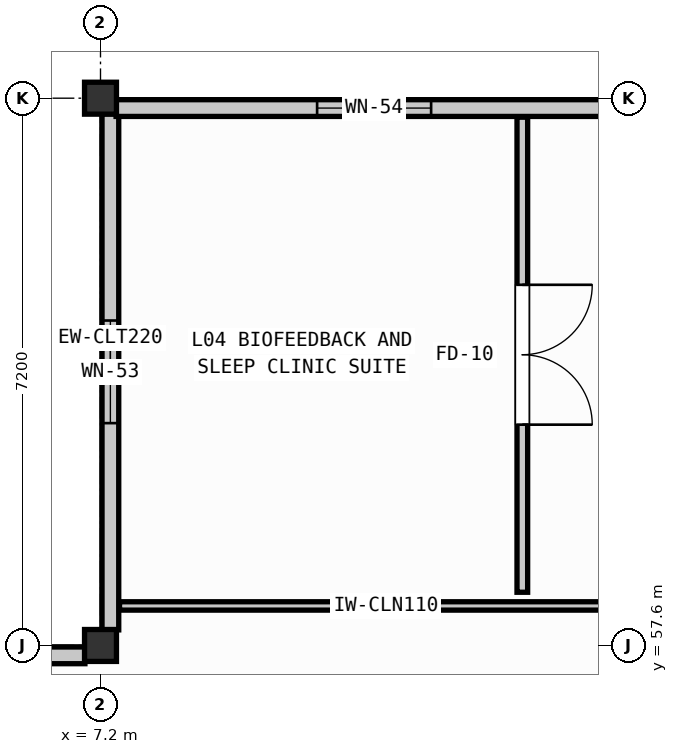
"""IFC4 building model, lengths in metres.
Left out: names, types, materials, properties, quantities, classifications, styles, units other than length and angle.
Written with IfcOpenShell. Run it as: python <this file> out.ifc"""

import sys

from ifc_helpers import new_model, si_unit, direction, frame, frame_2d, origin, origin_2d, place, context, subcontext, project, spatial, rectangle, extrude, element, fill, save


model = new_model("IFC4")
c1 = context("Model", 3, precision=1e-05, world=origin(), true_north=direction((0.0, 1.0)))
c2 = subcontext(c1, "Body", "Model", "MODEL_VIEW")
j1 = project(units=[si_unit("LENGTHUNIT", "METRE"), si_unit("PLANEANGLEUNIT", "RADIAN")], contexts=[c1])
p1 = place(None, origin())
s1 = spatial("IfcSite", under=j1, at=p1, CompositionType="ELEMENT")
p2 = place(p1, origin())
s2 = spatial("IfcBuilding", under=s1, at=p2, CompositionType="ELEMENT")
p3 = place(p2, frame((0.0, 0.0, 13.5)))
s3 = spatial("IfcBuildingStorey", under=s2, at=p3, CompositionType="ELEMENT", Elevation=13.5)
for number, where, z_axis, x_axis in (
    (1, (7.2, 57.6, 0.0), (0.0, 0.0, 1.0), (1.0, 0.0, 0.0)),
    (2, (7.2, 64.8, 0.0), (0.0, 0.0, 1.0), (1.0, 0.0, 0.0)),
):
    element("IfcColumn", number, at=place(p3, frame(where, z_axis=z_axis, x_axis=x_axis)), inside=s3, PredefinedType="COLUMN", context=c2, shape_type="SweptSolid", body=[
        extrude(rectangle(XDim=0.42, YDim=0.42, at=origin_2d()), origin(), (0.0, 0.0, 1.0), 3.99),
    ])
p4 = place(p3, frame((7.33, 57.805, 0.0), z_axis=(0.0, 0.0, 1.0), x_axis=(0.0, 1.0, 0.0)))
e3 = element("IfcWall", 3, at=p4, inside=s3, PredefinedType="SOLIDWALL", context=c2, shape_type="SweptSolid", body=[
    extrude(rectangle(XDim=6.79, YDim=0.22, at=frame_2d((3.395, 0.0))), origin(), (0.0, 0.0, 1.0), 3.27),
])
p5 = place(p4, frame((2.72, 0.0, 0.95)))
e4 = element("IfcOpeningElement", 4, at=p5, cuts=e3, PredefinedType="OPENING", context=c2, shape_type="SweptSolid", body=[
    extrude(rectangle(XDim=1.35, YDim=1.85, at=frame_2d((0.675, 0.925))), frame((0.0, 0.12, 0.0), z_axis=(0.0, -1.0, 0.0), x_axis=(1.0, 0.0, 0.0)), (0.0, 0.0, 1.0), 0.24),
])
p6 = place(p3, frame((7.405, 64.67, 0.0), z_axis=(0.0, 0.0, 1.0), x_axis=(1.0, 0.0, 0.0)))
e5 = element("IfcWall", 5, at=p6, inside=s3, PredefinedType="SOLIDWALL", context=c2, shape_type="SweptSolid", body=[
    extrude(rectangle(XDim=6.79, YDim=0.22, at=frame_2d((3.395, 0.0))), origin(), (0.0, 0.0, 1.0), 3.27),
])
p7 = place(p6, frame((2.645, 0.0, 0.95)))
e6 = element("IfcOpeningElement", 6, at=p7, cuts=e5, PredefinedType="OPENING", context=c2, shape_type="SweptSolid", body=[
    extrude(rectangle(XDim=1.5, YDim=1.85, at=frame_2d((0.75, 0.925))), frame((0.0, 0.12, 0.0), z_axis=(0.0, -1.0, 0.0), x_axis=(1.0, 0.0, 0.0)), (0.0, 0.0, 1.0), 0.24),
])
p8 = place(p3, frame((-0.04, 57.47, 0.0), z_axis=(0.0, 0.0, 1.0), x_axis=(1.0, 0.0, 0.0)))
e7 = element("IfcWall", 7, at=p8, inside=s3, PredefinedType="SOLIDWALL", context=c2, shape_type="SweptSolid", body=[
    extrude(rectangle(XDim=7.035, YDim=0.22, at=frame_2d((3.518, 0.0))), origin(), (0.0, 0.0, 1.0), 3.35),
])
p9 = place(p8, frame((2.542, 0.0, 2.1)))
e8 = element("IfcOpeningElement", 8, at=p9, cuts=e7, PredefinedType="OPENING", context=c2, shape_type="SweptSolid", body=[
    extrude(rectangle(XDim=1.95, YDim=0.65, at=frame_2d((0.975, 0.325))), frame((0.0, 0.12, 0.0), z_axis=(0.0, -1.0, 0.0), x_axis=(1.0, 0.0, 0.0)), (0.0, 0.0, 1.0), 0.24),
])
p10 = place(p3, frame((7.45, 58.12, 0.0), z_axis=(0.0, 0.0, 1.0), x_axis=(1.0, 0.0, 0.0)))
e9 = element("IfcWall", 9, at=p10, inside=s3, PredefinedType="PARTITIONING", context=c2, shape_type="SweptSolid", body=[
    extrude(rectangle(XDim=7.01, YDim=0.11, at=frame_2d((3.505, 0.0))), origin(), (0.0, 0.0, 1.0), 3.35),
])
p11 = place(p3, frame((12.75, 64.55, 0.0), z_axis=(0.0, 0.0, 1.0), x_axis=(0.0, -1.0, 0.0)))
e10 = element("IfcWall", 10, at=p11, inside=s3, PredefinedType="PARTITIONING", context=c2, shape_type="SweptSolid", body=[
    extrude(rectangle(XDim=6.25, YDim=0.14, at=frame_2d((3.125, 0.0))), origin(), (0.0, 0.0, 1.0), 3.27),
])
p12 = place(p11, frame((2.205, 0.0, 0.0)))
e11 = element("IfcOpeningElement", 11, at=p12, cuts=e10, PredefinedType="OPENING", context=c2, shape_type="SweptSolid", body=[
    extrude(rectangle(XDim=1.84, YDim=2.28, at=frame_2d((0.92, 1.14))), frame((0.0, 0.08, 0.0), z_axis=(0.0, -1.0, 0.0), x_axis=(1.0, 0.0, 0.0)), (0.0, 0.0, 1.0), 0.16),
])
p13 = place(p5, origin())
e12 = element("IfcWindow", 12, at=p13, inside=s3, PartitioningType="SINGLE_PANEL", PredefinedType="WINDOW", context=c2, shape_type="SweptSolid", body=[
    extrude(rectangle(XDim=1.35, YDim=1.85, at=frame_2d((0.675, 0.925))), frame((0.0, 0.03, 0.0), z_axis=(0.0, -1.0, 0.0), x_axis=(1.0, 0.0, 0.0)), (0.0, 0.0, 1.0), 0.06),
])
fill(e4, e12)
p14 = place(p7, origin())
e13 = element("IfcWindow", 13, at=p14, inside=s3, PartitioningType="SINGLE_PANEL", PredefinedType="WINDOW", context=c2, shape_type="SweptSolid", body=[
    extrude(rectangle(XDim=1.5, YDim=1.85, at=frame_2d((0.75, 0.925))), frame((0.0, 0.03, 0.0), z_axis=(0.0, -1.0, 0.0), x_axis=(1.0, 0.0, 0.0)), (0.0, 0.0, 1.0), 0.06),
])
fill(e6, e13)
p15 = place(p12, origin())
e14 = element("IfcDoor", 14, at=p15, inside=s3, OperationType="DOUBLE_DOOR_SINGLE_SWING", PredefinedType="DOOR", context=c2, shape_type="SweptSolid", body=[
    extrude(rectangle(XDim=1.84, YDim=2.28, at=frame_2d((0.92, 1.14))), frame((0.0, 0.025, 0.0), z_axis=(0.0, -1.0, 0.0), x_axis=(1.0, 0.0, 0.0)), (0.0, 0.0, 1.0), 0.05),
])
fill(e11, e14)
save(model, sys.argv[1])
